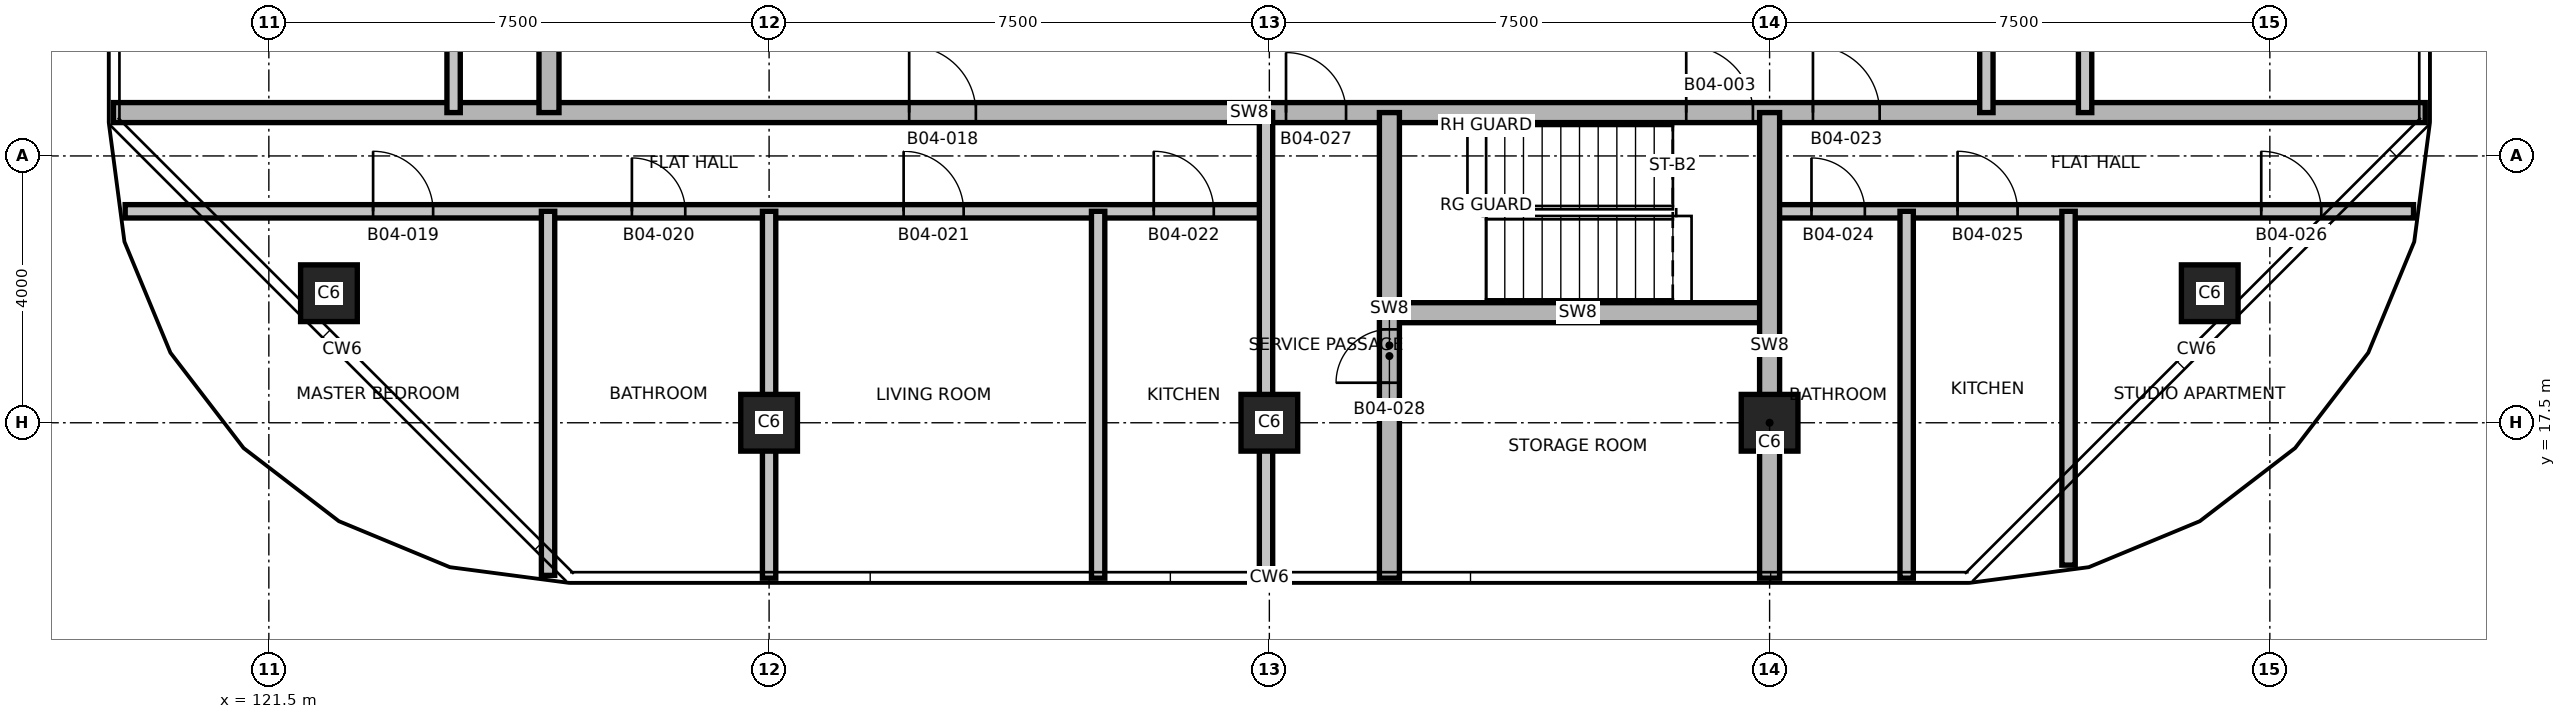
"""IFC4 building model, lengths in metres.
Left out: names, types, materials, properties, quantities, classifications, styles, units other than length and angle.
Written with IfcOpenShell. Run it as: python <this file> out.ifc"""

import sys

from ifc_helpers import new_model, si_unit, direction, frame, frame_2d, origin, origin_2d, place, context, subcontext, project, spatial, rectangle, extrude, element, fill, save


model = new_model("IFC4")
c1 = context("Model", 3, precision=1e-05, world=origin(), true_north=direction((0.0, 1.0)))
c2 = subcontext(c1, "Body", "Model", "MODEL_VIEW")
j1 = project(units=[si_unit("LENGTHUNIT", "METRE"), si_unit("PLANEANGLEUNIT", "RADIAN")], contexts=[c1])
p1 = place(None, origin())
s1 = spatial("IfcSite", under=j1, at=p1, CompositionType="ELEMENT")
p2 = place(p1, origin())
s2 = spatial("IfcBuilding", under=s1, at=p2, CompositionType="ELEMENT")
p3 = place(p2, frame((0.0, 0.0, 63.1)))
s3 = spatial("IfcBuildingStorey", under=s2, at=p3, CompositionType="ELEMENT", Elevation=63.1)
for number, where, z_axis, x_axis in (
    (1, (129.0, 17.5, 0.0), (0.0, 0.0, 1.0), (1.0, 0.0, 0.0)),
    (2, (136.5, 17.5, 0.0), (0.0, 0.0, 1.0), (1.0, 0.0, 0.0)),
    (3, (144.0, 17.5, 0.0), (0.0, 0.0, 1.0), (1.0, 0.0, 0.0)),
    (4, (122.401, 19.442, 0.0), (0.0, 0.0, 1.0), (1.0, 0.0, 0.0)),
    (5, (150.599, 19.442, 0.0), (0.0, 0.0, 1.0), (1.0, 0.0, 0.0)),
):
    element("IfcColumn", number, at=place(p3, frame(where, z_axis=z_axis, x_axis=x_axis)), inside=s3, PredefinedType="COLUMN", context=c2, shape_type="SweptSolid", body=[
        extrude(rectangle(XDim=0.85, YDim=0.85, at=origin_2d()), origin(), (0.0, 0.0, 1.0), 3.7),
    ])
p4 = place(p3, frame((138.25, 19.15, 0.0), z_axis=(0.0, 0.0, 1.0), x_axis=(1.0, 0.0, 0.0)))
e6 = element("IfcWall", 6, at=p4, inside=s3, PredefinedType="SHEAR", context=c2, shape_type="SweptSolid", body=[
    extrude(rectangle(XDim=5.75, YDim=0.3, at=frame_2d((2.875, 0.0))), origin(), (0.0, 0.0, 1.0), 3.4),
])
p5 = place(p3, frame((119.346, 20.67, 0.0), z_axis=(0.0, 0.0, 1.0), x_axis=(1.0, 0.0, 0.0)))
e7 = element("IfcWall", 7, at=p5, inside=s3, PredefinedType="PARTITIONING", context=c2, shape_type="SweptSolid", body=[
    extrude(rectangle(XDim=17.154, YDim=0.2, at=frame_2d((8.577, 0.0))), origin(), (0.0, 0.0, 1.0), 3.4),
])
p6 = place(p5, frame((3.717, 0.0, 0.0)))
e8 = element("IfcOpeningElement", 8, at=p6, cuts=e7, PredefinedType="OPENING", context=c2, shape_type="SweptSolid", body=[
    extrude(rectangle(XDim=0.9, YDim=2.1, at=frame_2d((0.45, 1.05))), frame((0.0, 0.11, 0.0), z_axis=(0.0, -1.0, 0.0), x_axis=(1.0, 0.0, 0.0)), (0.0, 0.0, 1.0), 0.22),
])
p7 = place(p5, frame((7.597, 0.0, 0.0)))
e9 = element("IfcOpeningElement", 9, at=p7, cuts=e7, PredefinedType="OPENING", context=c2, shape_type="SweptSolid", body=[
    extrude(rectangle(XDim=0.8, YDim=2.1, at=frame_2d((0.4, 1.05))), frame((0.0, 0.11, 0.0), z_axis=(0.0, -1.0, 0.0), x_axis=(1.0, 0.0, 0.0)), (0.0, 0.0, 1.0), 0.22),
])
p8 = place(p5, frame((11.671, 0.0, 0.0)))
e10 = element("IfcOpeningElement", 10, at=p8, cuts=e7, PredefinedType="OPENING", context=c2, shape_type="SweptSolid", body=[
    extrude(rectangle(XDim=0.9, YDim=2.1, at=frame_2d((0.45, 1.05))), frame((0.0, 0.11, 0.0), z_axis=(0.0, -1.0, 0.0), x_axis=(1.0, 0.0, 0.0)), (0.0, 0.0, 1.0), 0.22),
])
p9 = place(p5, frame((15.421, 0.0, 0.0)))
e11 = element("IfcOpeningElement", 11, at=p9, cuts=e7, PredefinedType="OPENING", context=c2, shape_type="SweptSolid", body=[
    extrude(rectangle(XDim=0.9, YDim=2.1, at=frame_2d((0.45, 1.05))), frame((0.0, 0.11, 0.0), z_axis=(0.0, -1.0, 0.0), x_axis=(1.0, 0.0, 0.0)), (0.0, 0.0, 1.0), 0.22),
])
p10 = place(p3, frame((144.0, 20.67, 0.0), z_axis=(0.0, 0.0, 1.0), x_axis=(1.0, 0.0, 0.0)))
e12 = element("IfcWall", 12, at=p10, inside=s3, PredefinedType="PARTITIONING", context=c2, shape_type="SweptSolid", body=[
    extrude(rectangle(XDim=9.654, YDim=0.2, at=frame_2d((4.827, 0.0))), origin(), (0.0, 0.0, 1.0), 3.4),
])
p11 = place(p10, frame((0.628, 0.0, 0.0)))
e13 = element("IfcOpeningElement", 13, at=p11, cuts=e12, PredefinedType="OPENING", context=c2, shape_type="SweptSolid", body=[
    extrude(rectangle(XDim=0.8, YDim=2.1, at=frame_2d((0.4, 1.05))), frame((0.0, 0.11, 0.0), z_axis=(0.0, -1.0, 0.0), x_axis=(1.0, 0.0, 0.0)), (0.0, 0.0, 1.0), 0.22),
])
p12 = place(p10, frame((2.818, 0.0, 0.0)))
e14 = element("IfcOpeningElement", 14, at=p12, cuts=e12, PredefinedType="OPENING", context=c2, shape_type="SweptSolid", body=[
    extrude(rectangle(XDim=0.9, YDim=2.1, at=frame_2d((0.45, 1.05))), frame((0.0, 0.11, 0.0), z_axis=(0.0, -1.0, 0.0), x_axis=(1.0, 0.0, 0.0)), (0.0, 0.0, 1.0), 0.22),
])
p13 = place(p10, frame((7.371, 0.0, 0.0)))
e15 = element("IfcOpeningElement", 15, at=p13, cuts=e12, PredefinedType="OPENING", context=c2, shape_type="SweptSolid", body=[
    extrude(rectangle(XDim=0.9, YDim=2.1, at=frame_2d((0.45, 1.05))), frame((0.0, 0.11, 0.0), z_axis=(0.0, -1.0, 0.0), x_axis=(1.0, 0.0, 0.0)), (0.0, 0.0, 1.0), 0.22),
])
p14 = place(p3, frame((119.17, 22.15, 0.0), z_axis=(0.0, 0.0, 1.0), x_axis=(1.0, 0.0, 0.0)))
e16 = element("IfcWall", 16, at=p14, inside=s3, PredefinedType="SHEAR", context=c2, shape_type="SweptSolid", body=[
    extrude(rectangle(XDim=34.66, YDim=0.3, at=frame_2d((17.33, 0.0))), origin(), (0.0, 0.0, 1.0), 3.4),
])
p15 = place(p14, frame((23.58, 0.0, 0.0)))
e17 = element("IfcOpeningElement", 17, at=p15, cuts=e16, PredefinedType="OPENING", context=c2, shape_type="SweptSolid", body=[
    extrude(rectangle(XDim=1.0, YDim=2.1, at=frame_2d((0.5, 1.05))), frame((0.0, 0.16, 0.0), z_axis=(0.0, -1.0, 0.0), x_axis=(1.0, 0.0, 0.0)), (0.0, 0.0, 1.0), 0.32),
])
p16 = place(p14, frame((11.93, 0.0, 0.0)))
e18 = element("IfcOpeningElement", 18, at=p16, cuts=e16, PredefinedType="OPENING", context=c2, shape_type="SweptSolid", body=[
    extrude(rectangle(XDim=1.0, YDim=2.1, at=frame_2d((0.5, 1.05))), frame((0.0, 0.16, 0.0), z_axis=(0.0, -1.0, 0.0), x_axis=(1.0, 0.0, 0.0)), (0.0, 0.0, 1.0), 0.32),
])
p17 = place(p14, frame((25.48, 0.0, 0.0)))
e19 = element("IfcOpeningElement", 19, at=p17, cuts=e16, PredefinedType="OPENING", context=c2, shape_type="SweptSolid", body=[
    extrude(rectangle(XDim=1.0, YDim=2.1, at=frame_2d((0.5, 1.05))), frame((0.0, 0.16, 0.0), z_axis=(0.0, -1.0, 0.0), x_axis=(1.0, 0.0, 0.0)), (0.0, 0.0, 1.0), 0.32),
])
p18 = place(p14, frame((17.58, 0.0, 0.0)))
e20 = element("IfcOpeningElement", 20, at=p18, cuts=e16, PredefinedType="OPENING", context=c2, shape_type="SweptSolid", body=[
    extrude(rectangle(XDim=0.9, YDim=2.1, at=frame_2d((0.45, 1.05))), frame((0.0, 0.16, 0.0), z_axis=(0.0, -1.0, 0.0), x_axis=(1.0, 0.0, 0.0)), (0.0, 0.0, 1.0), 0.32),
])
p19 = place(p3, frame((124.27, 22.15, 0.0), z_axis=(0.0, 0.0, 1.0), x_axis=(0.0, 1.0, 0.0)))
e21 = element("IfcWall", 21, at=p19, inside=s3, PredefinedType="PARTITIONING", context=c2, shape_type="SweptSolid", body=[
    extrude(rectangle(XDim=17.7, YDim=0.2, at=frame_2d((8.85, 0.0))), origin(), (0.0, 0.0, 1.0), 3.4),
])
p20 = place(p19, frame((1.725, 0.0, 0.0)))
e22 = element("IfcOpeningElement", 22, at=p20, cuts=e21, PredefinedType="OPENING", context=c2, shape_type="SweptSolid", body=[
    extrude(rectangle(XDim=0.9, YDim=2.1, at=frame_2d((0.45, 1.05))), frame((0.0, 0.11, 0.0), z_axis=(0.0, -1.0, 0.0), x_axis=(1.0, 0.0, 0.0)), (0.0, 0.0, 1.0), 0.22),
])
p21 = place(p19, frame((6.867, 0.0, 0.0)))
e23 = element("IfcOpeningElement", 23, at=p21, cuts=e21, PredefinedType="OPENING", context=c2, shape_type="SweptSolid", body=[
    extrude(rectangle(XDim=0.9, YDim=2.1, at=frame_2d((0.45, 1.05))), frame((0.0, 0.11, 0.0), z_axis=(0.0, -1.0, 0.0), x_axis=(1.0, 0.0, 0.0)), (0.0, 0.0, 1.0), 0.22),
])
p22 = place(p19, frame((11.367, 0.0, 0.0)))
e24 = element("IfcOpeningElement", 24, at=p22, cuts=e21, PredefinedType="OPENING", context=c2, shape_type="SweptSolid", body=[
    extrude(rectangle(XDim=0.9, YDim=2.1, at=frame_2d((0.45, 1.05))), frame((0.0, 0.11, 0.0), z_axis=(0.0, -1.0, 0.0), x_axis=(1.0, 0.0, 0.0)), (0.0, 0.0, 1.0), 0.22),
])
p23 = place(p19, frame((14.378, 0.0, 0.0)))
e25 = element("IfcOpeningElement", 25, at=p23, cuts=e21, PredefinedType="OPENING", context=c2, shape_type="SweptSolid", body=[
    extrude(rectangle(XDim=0.9, YDim=2.1, at=frame_2d((0.45, 1.05))), frame((0.0, 0.11, 0.0), z_axis=(0.0, -1.0, 0.0), x_axis=(1.0, 0.0, 0.0)), (0.0, 0.0, 1.0), 0.22),
])
p24 = place(p19, frame((16.603, 0.0, 0.0)))
e26 = element("IfcOpeningElement", 26, at=p24, cuts=e21, PredefinedType="OPENING", context=c2, shape_type="SweptSolid", body=[
    extrude(rectangle(XDim=0.8, YDim=2.1, at=frame_2d((0.4, 1.05))), frame((0.0, 0.11, 0.0), z_axis=(0.0, -1.0, 0.0), x_axis=(1.0, 0.0, 0.0)), (0.0, 0.0, 1.0), 0.22),
])
p25 = place(p3, frame((125.686, 15.212, 0.0), z_axis=(0.0, 0.0, 1.0), x_axis=(0.0, 1.0, 0.0)))
e27 = element("IfcWall", 27, at=p25, inside=s3, PredefinedType="PARTITIONING", context=c2, shape_type="SweptSolid", body=[
    extrude(rectangle(XDim=5.458, YDim=0.2, at=frame_2d((2.729, 0.0))), origin(), (0.0, 0.0, 1.0), 3.4),
])
p26 = place(p3, frame((125.7, 22.15, 0.0), z_axis=(0.0, 0.0, 1.0), x_axis=(0.0, 1.0, 0.0)))
e28 = element("IfcWall", 28, at=p26, inside=s3, PredefinedType="SHEAR", context=c2, shape_type="SweptSolid", body=[
    extrude(rectangle(XDim=17.7, YDim=0.3, at=frame_2d((8.85, 0.0))), origin(), (0.0, 0.0, 1.0), 3.4),
])
p27 = place(p26, frame((2.7, 0.0, 0.0)))
e29 = element("IfcOpeningElement", 29, at=p27, cuts=e28, PredefinedType="OPENING", context=c2, shape_type="SweptSolid", body=[
    extrude(rectangle(XDim=1.0, YDim=2.1, at=frame_2d((0.5, 1.05))), frame((0.0, 0.16, 0.0), z_axis=(0.0, -1.0, 0.0), x_axis=(1.0, 0.0, 0.0)), (0.0, 0.0, 1.0), 0.32),
])
for number, where, z_axis, x_axis in (
    (30, (129.0, 15.17, 0.0), (0.0, 0.0, 1.0), (0.0, 1.0, 0.0)),
    (31, (133.933, 15.17, 0.0), (0.0, 0.0, 1.0), (0.0, 1.0, 0.0)),
):
    element("IfcWall", number, at=place(p3, frame(where, z_axis=z_axis, x_axis=x_axis)), inside=s3, PredefinedType="PARTITIONING", context=c2, shape_type="SweptSolid", body=[
        extrude(rectangle(XDim=5.5, YDim=0.2, at=frame_2d((2.75, 0.0))), origin(), (0.0, 0.0, 1.0), 3.4),
    ])
p28 = place(p3, frame((136.45, 15.17, 0.0), z_axis=(0.0, 0.0, 1.0), x_axis=(0.0, 1.0, 0.0)))
e32 = element("IfcWall", 32, at=p28, inside=s3, PredefinedType="PARTITIONING", context=c2, shape_type="SweptSolid", body=[
    extrude(rectangle(XDim=6.98, YDim=0.2, at=frame_2d((3.49, 0.0))), origin(), (0.0, 0.0, 1.0), 3.4),
])
p29 = place(p3, frame((138.3, 15.17, 0.0), z_axis=(0.0, 0.0, 1.0), x_axis=(0.0, 1.0, 0.0)))
e33 = element("IfcWall", 33, at=p29, inside=s3, PredefinedType="SHEAR", context=c2, shape_type="SweptSolid", body=[
    extrude(rectangle(XDim=6.98, YDim=0.3, at=frame_2d((3.49, 0.0))), origin(), (0.0, 0.0, 1.0), 3.4),
])
p30 = place(p29, frame((2.93, 0.0, 0.0)))
e34 = element("IfcOpeningElement", 34, at=p30, cuts=e33, PredefinedType="OPENING", context=c2, shape_type="SweptSolid", body=[
    extrude(rectangle(XDim=0.8, YDim=2.1, at=frame_2d((0.4, 1.05))), frame((0.0, 0.16, 0.0), z_axis=(0.0, -1.0, 0.0), x_axis=(1.0, 0.0, 0.0)), (0.0, 0.0, 1.0), 0.32),
])
p31 = place(p3, frame((144.0, 15.17, 0.0), z_axis=(0.0, 0.0, 1.0), x_axis=(0.0, 1.0, 0.0)))
e35 = element("IfcWall", 35, at=p31, inside=s3, PredefinedType="SHEAR", context=c2, shape_type="SweptSolid", body=[
    extrude(rectangle(XDim=6.98, YDim=0.3, at=frame_2d((3.49, 0.0))), origin(), (0.0, 0.0, 1.0), 3.4),
])
p32 = place(p3, frame((146.055, 15.17, 0.0), z_axis=(0.0, 0.0, 1.0), x_axis=(0.0, 1.0, 0.0)))
e36 = element("IfcWall", 36, at=p32, inside=s3, PredefinedType="PARTITIONING", context=c2, shape_type="SweptSolid", body=[
    extrude(rectangle(XDim=5.5, YDim=0.2, at=frame_2d((2.75, 0.0))), origin(), (0.0, 0.0, 1.0), 3.4),
])
p33 = place(p3, frame((147.25, 22.15, 0.0), z_axis=(0.0, 0.0, 1.0), x_axis=(0.0, 1.0, 0.0)))
e37 = element("IfcWall", 37, at=p33, inside=s3, PredefinedType="PARTITIONING", context=c2, shape_type="SweptSolid", body=[
    extrude(rectangle(XDim=17.7, YDim=0.2, at=frame_2d((8.85, 0.0))), origin(), (0.0, 0.0, 1.0), 3.4),
])
p34 = place(p33, frame((2.65, 0.0, 0.0)))
e38 = element("IfcOpeningElement", 38, at=p34, cuts=e37, PredefinedType="OPENING", context=c2, shape_type="SweptSolid", body=[
    extrude(rectangle(XDim=1.0, YDim=2.1, at=frame_2d((0.5, 1.05))), frame((0.0, 0.11, 0.0), z_axis=(0.0, -1.0, 0.0), x_axis=(1.0, 0.0, 0.0)), (0.0, 0.0, 1.0), 0.22),
])
p35 = place(p3, frame((148.482, 15.366, 0.0), z_axis=(0.0, 0.0, 1.0), x_axis=(0.0, 1.0, 0.0)))
e39 = element("IfcWall", 39, at=p35, inside=s3, PredefinedType="PARTITIONING", context=c2, shape_type="SweptSolid", body=[
    extrude(rectangle(XDim=5.304, YDim=0.2, at=frame_2d((2.652, 0.0))), origin(), (0.0, 0.0, 1.0), 3.4),
])
p36 = place(p3, frame((148.73, 22.15, 0.0), z_axis=(0.0, 0.0, 1.0), x_axis=(0.0, 1.0, 0.0)))
e40 = element("IfcWall", 40, at=p36, inside=s3, PredefinedType="PARTITIONING", context=c2, shape_type="SweptSolid", body=[
    extrude(rectangle(XDim=17.7, YDim=0.2, at=frame_2d((8.85, 0.0))), origin(), (0.0, 0.0, 1.0), 3.4),
])
p37 = place(p36, frame((1.028, 0.0, 0.0)))
e41 = element("IfcOpeningElement", 41, at=p37, cuts=e40, PredefinedType="OPENING", context=c2, shape_type="SweptSolid", body=[
    extrude(rectangle(XDim=0.9, YDim=2.1, at=frame_2d((0.45, 1.05))), frame((0.0, 0.11, 0.0), z_axis=(0.0, -1.0, 0.0), x_axis=(1.0, 0.0, 0.0)), (0.0, 0.0, 1.0), 0.22),
])
p38 = place(p36, frame((3.253, 0.0, 0.0)))
e42 = element("IfcOpeningElement", 42, at=p38, cuts=e40, PredefinedType="OPENING", context=c2, shape_type="SweptSolid", body=[
    extrude(rectangle(XDim=0.8, YDim=2.1, at=frame_2d((0.4, 1.05))), frame((0.0, 0.11, 0.0), z_axis=(0.0, -1.0, 0.0), x_axis=(1.0, 0.0, 0.0)), (0.0, 0.0, 1.0), 0.22),
])
p39 = place(p36, frame((6.195, 0.0, 0.0)))
e43 = element("IfcOpeningElement", 43, at=p39, cuts=e40, PredefinedType="OPENING", context=c2, shape_type="SweptSolid", body=[
    extrude(rectangle(XDim=0.9, YDim=2.1, at=frame_2d((0.45, 1.05))), frame((0.0, 0.11, 0.0), z_axis=(0.0, -1.0, 0.0), x_axis=(1.0, 0.0, 0.0)), (0.0, 0.0, 1.0), 0.22),
])
p40 = place(p36, frame((9.641, 0.0, 0.0)))
e44 = element("IfcOpeningElement", 44, at=p40, cuts=e40, PredefinedType="OPENING", context=c2, shape_type="SweptSolid", body=[
    extrude(rectangle(XDim=0.9, YDim=2.1, at=frame_2d((0.45, 1.05))), frame((0.0, 0.11, 0.0), z_axis=(0.0, -1.0, 0.0), x_axis=(1.0, 0.0, 0.0)), (0.0, 0.0, 1.0), 0.22),
])
p41 = place(p36, frame((11.895, 0.0, 0.0)))
e45 = element("IfcOpeningElement", 45, at=p41, cuts=e40, PredefinedType="OPENING", context=c2, shape_type="SweptSolid", body=[
    extrude(rectangle(XDim=0.8, YDim=2.1, at=frame_2d((0.4, 1.05))), frame((0.0, 0.11, 0.0), z_axis=(0.0, -1.0, 0.0), x_axis=(1.0, 0.0, 0.0)), (0.0, 0.0, 1.0), 0.22),
])
p42 = place(p36, frame((15.075, 0.0, 0.0)))
e46 = element("IfcOpeningElement", 46, at=p42, cuts=e40, PredefinedType="OPENING", context=c2, shape_type="SweptSolid", body=[
    extrude(rectangle(XDim=0.9, YDim=2.1, at=frame_2d((0.45, 1.05))), frame((0.0, 0.11, 0.0), z_axis=(0.0, -1.0, 0.0), x_axis=(1.0, 0.0, 0.0)), (0.0, 0.0, 1.0), 0.22),
])
p43 = place(p15, origin())
e47 = element("IfcDoor", 47, at=p43, inside=s3, OperationType="SINGLE_SWING_LEFT", PredefinedType="DOOR", context=c2, shape_type="SweptSolid", body=[
    extrude(rectangle(XDim=1.0, YDim=2.1, at=frame_2d((0.5, 1.05))), frame((0.0, 0.025, 0.0), z_axis=(0.0, -1.0, 0.0), x_axis=(1.0, 0.0, 0.0)), (0.0, 0.0, 1.0), 0.05),
])
fill(e17, e47)
p44 = place(p16, origin())
e48 = element("IfcDoor", 48, at=p44, inside=s3, OperationType="SINGLE_SWING_RIGHT", PredefinedType="DOOR", context=c2, shape_type="SweptSolid", body=[
    extrude(rectangle(XDim=1.0, YDim=2.1, at=frame_2d((0.5, 1.05))), frame((0.0, 0.025, 0.0), z_axis=(0.0, -1.0, 0.0), x_axis=(1.0, 0.0, 0.0)), (0.0, 0.0, 1.0), 0.05),
])
fill(e18, e48)
p45 = place(p6, origin())
e49 = element("IfcDoor", 49, at=p45, inside=s3, OperationType="SINGLE_SWING_LEFT", PredefinedType="DOOR", context=c2, shape_type="SweptSolid", body=[
    extrude(rectangle(XDim=0.9, YDim=2.1, at=frame_2d((0.45, 1.05))), frame((0.0, 0.025, 0.0), z_axis=(0.0, -1.0, 0.0), x_axis=(1.0, 0.0, 0.0)), (0.0, 0.0, 1.0), 0.05),
])
fill(e8, e49)
p46 = place(p7, origin())
e50 = element("IfcDoor", 50, at=p46, inside=s3, OperationType="SINGLE_SWING_RIGHT", PredefinedType="DOOR", context=c2, shape_type="SweptSolid", body=[
    extrude(rectangle(XDim=0.8, YDim=2.1, at=frame_2d((0.4, 1.05))), frame((0.0, 0.025, 0.0), z_axis=(0.0, -1.0, 0.0), x_axis=(1.0, 0.0, 0.0)), (0.0, 0.0, 1.0), 0.05),
])
fill(e9, e50)
p47 = place(p8, origin())
e51 = element("IfcDoor", 51, at=p47, inside=s3, OperationType="SINGLE_SWING_LEFT", PredefinedType="DOOR", context=c2, shape_type="SweptSolid", body=[
    extrude(rectangle(XDim=0.9, YDim=2.1, at=frame_2d((0.45, 1.05))), frame((0.0, 0.025, 0.0), z_axis=(0.0, -1.0, 0.0), x_axis=(1.0, 0.0, 0.0)), (0.0, 0.0, 1.0), 0.05),
])
fill(e10, e51)
p48 = place(p9, origin())
e52 = element("IfcDoor", 52, at=p48, inside=s3, OperationType="SINGLE_SWING_RIGHT", PredefinedType="DOOR", context=c2, shape_type="SweptSolid", body=[
    extrude(rectangle(XDim=0.9, YDim=2.1, at=frame_2d((0.45, 1.05))), frame((0.0, 0.025, 0.0), z_axis=(0.0, -1.0, 0.0), x_axis=(1.0, 0.0, 0.0)), (0.0, 0.0, 1.0), 0.05),
])
fill(e11, e52)
p49 = place(p17, origin())
e53 = element("IfcDoor", 53, at=p49, inside=s3, OperationType="SINGLE_SWING_LEFT", PredefinedType="DOOR", context=c2, shape_type="SweptSolid", body=[
    extrude(rectangle(XDim=1.0, YDim=2.1, at=frame_2d((0.5, 1.05))), frame((0.0, 0.025, 0.0), z_axis=(0.0, -1.0, 0.0), x_axis=(1.0, 0.0, 0.0)), (0.0, 0.0, 1.0), 0.05),
])
fill(e19, e53)
p50 = place(p11, origin())
e54 = element("IfcDoor", 54, at=p50, inside=s3, OperationType="SINGLE_SWING_RIGHT", PredefinedType="DOOR", context=c2, shape_type="SweptSolid", body=[
    extrude(rectangle(XDim=0.8, YDim=2.1, at=frame_2d((0.4, 1.05))), frame((0.0, 0.025, 0.0), z_axis=(0.0, -1.0, 0.0), x_axis=(1.0, 0.0, 0.0)), (0.0, 0.0, 1.0), 0.05),
])
fill(e13, e54)
p51 = place(p12, origin())
e55 = element("IfcDoor", 55, at=p51, inside=s3, OperationType="SINGLE_SWING_LEFT", PredefinedType="DOOR", context=c2, shape_type="SweptSolid", body=[
    extrude(rectangle(XDim=0.9, YDim=2.1, at=frame_2d((0.45, 1.05))), frame((0.0, 0.025, 0.0), z_axis=(0.0, -1.0, 0.0), x_axis=(1.0, 0.0, 0.0)), (0.0, 0.0, 1.0), 0.05),
])
fill(e14, e55)
p52 = place(p13, origin())
e56 = element("IfcDoor", 56, at=p52, inside=s3, OperationType="SINGLE_SWING_RIGHT", PredefinedType="DOOR", context=c2, shape_type="SweptSolid", body=[
    extrude(rectangle(XDim=0.9, YDim=2.1, at=frame_2d((0.45, 1.05))), frame((0.0, 0.025, 0.0), z_axis=(0.0, -1.0, 0.0), x_axis=(1.0, 0.0, 0.0)), (0.0, 0.0, 1.0), 0.05),
])
fill(e15, e56)
p53 = place(p18, origin())
e57 = element("IfcDoor", 57, at=p53, inside=s3, OperationType="SINGLE_SWING_LEFT", PredefinedType="DOOR", context=c2, shape_type="SweptSolid", body=[
    extrude(rectangle(XDim=0.9, YDim=2.1, at=frame_2d((0.45, 1.05))), frame((0.0, 0.025, 0.0), z_axis=(0.0, -1.0, 0.0), x_axis=(1.0, 0.0, 0.0)), (0.0, 0.0, 1.0), 0.05),
])
fill(e20, e57)
p54 = place(p30, origin())
e58 = element("IfcDoor", 58, at=p54, inside=s3, OperationType="SINGLE_SWING_RIGHT", PredefinedType="DOOR", context=c2, shape_type="SweptSolid", body=[
    extrude(rectangle(XDim=0.8, YDim=2.1, at=frame_2d((0.4, 1.05))), frame((0.0, 0.025, 0.0), z_axis=(0.0, -1.0, 0.0), x_axis=(1.0, 0.0, 0.0)), (0.0, 0.0, 1.0), 0.05),
])
fill(e34, e58)
save(model, sys.argv[1])
